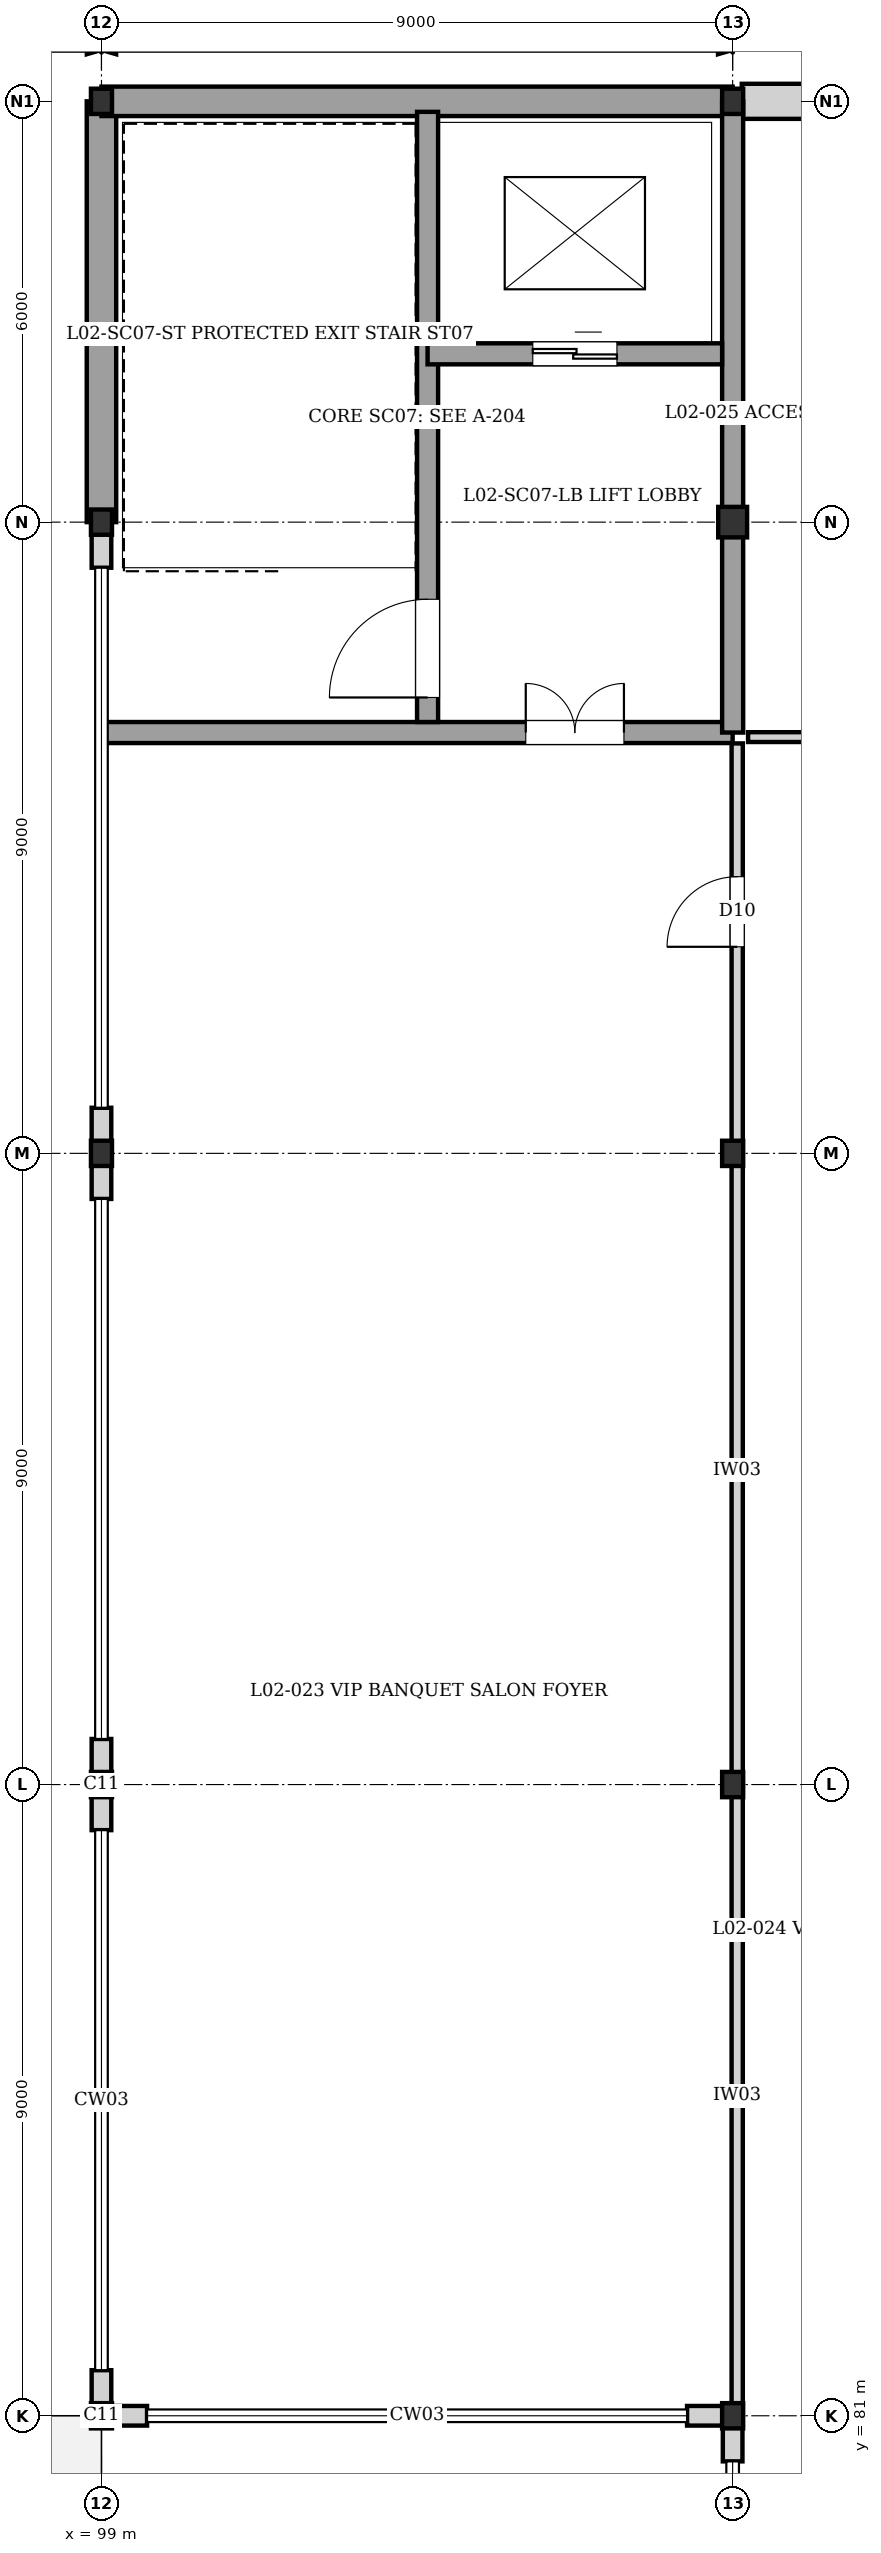
"""IFC4 building model, lengths in metres.
Left out: names, types, materials, properties, quantities, classifications, styles, units other than length and angle.
Written with IfcOpenShell. Run it as: python <this file> out.ifc"""

import sys

from ifc_helpers import new_model, si_unit, direction, frame, frame_2d, origin, origin_2d, place, context, subcontext, project, spatial, rectangle, i_section, extrude, element, fill, save


model = new_model("IFC4")
c1 = context("Model", 3, precision=1e-05, world=origin(), true_north=direction((0.0, 1.0)))
c2 = subcontext(c1, "Body", "Model", "MODEL_VIEW")
j1 = project(units=[si_unit("LENGTHUNIT", "METRE"), si_unit("PLANEANGLEUNIT", "RADIAN")], contexts=[c1])
p1 = place(None, origin())
s1 = spatial("IfcSite", under=j1, at=p1, CompositionType="ELEMENT")
p2 = place(p1, origin())
s2 = spatial("IfcBuilding", under=s1, at=p2, CompositionType="ELEMENT")
p3 = place(p2, frame((0.0, 0.0, 8.16)))
s3 = spatial("IfcBuildingStorey", under=s2, at=p3, CompositionType="ELEMENT", Elevation=8.16)
for number, where, z_axis, x_axis in (
    (1, (99.0, 81.0, 0.0), (0.0, 0.0, 1.0), (1.0, 0.0, 0.0)),
    (2, (99.0, 90.0, 0.0), (0.0, 0.0, 1.0), (1.0, 0.0, 0.0)),
    (3, (99.0, 99.0, 0.0), (0.0, 0.0, 1.0), (1.0, 0.0, 0.0)),
    (4, (99.0, 108.0, 0.0), (0.0, 0.0, 1.0), (1.0, 0.0, 0.0)),
    (5, (99.0, 114.0, 0.0), (0.0, 0.0, 1.0), (1.0, 0.0, 0.0)),
    (6, (108.0, 81.0, 0.0), (0.0, 0.0, 1.0), (1.0, 0.0, 0.0)),
    (7, (108.0, 90.0, 0.0), (0.0, 0.0, 1.0), (1.0, 0.0, 0.0)),
    (8, (108.0, 99.0, 0.0), (0.0, 0.0, 1.0), (1.0, 0.0, 0.0)),
):
    element("IfcColumn", number, at=place(p3, frame(where, z_axis=z_axis, x_axis=x_axis)), inside=s3, PredefinedType="COLUMN", context=c2, shape_type="SweptSolid", body=[
        extrude(i_section(OverallWidth=0.3, OverallDepth=0.36, WebThickness=0.012, FlangeThickness=0.022, at=origin_2d()), origin(), (0.0, 0.0, 1.0), 3.36),
    ])
p4 = place(p3, frame((108.0, 108.0, 0.0), z_axis=(0.0, 0.0, 1.0), x_axis=(1.0, 0.0, 0.0)))
e9 = element("IfcColumn", 9, at=p4, inside=s3, PredefinedType="COLUMN", context=c2, shape_type="SweptSolid", body=[
    extrude(i_section(OverallWidth=0.412, OverallDepth=0.435, WebThickness=0.027, FlangeThickness=0.046, at=origin_2d()), origin(), (0.0, 0.0, 1.0), 3.36),
])
p5 = place(p3, frame((108.0, 114.0, 0.0), z_axis=(0.0, 0.0, 1.0), x_axis=(1.0, 0.0, 0.0)))
e10 = element("IfcColumn", 10, at=p5, inside=s3, PredefinedType="COLUMN", context=c2, shape_type="SweptSolid", body=[
    extrude(i_section(OverallWidth=0.3, OverallDepth=0.36, WebThickness=0.012, FlangeThickness=0.022, at=origin_2d()), origin(), (0.0, 0.0, 1.0), 3.36),
])
p6 = place(p3, frame((108.0, 80.35, 0.0), z_axis=(0.0, 0.0, 1.0), x_axis=(0.0, 1.0, 0.0)))
e11 = element("IfcWall", 11, at=p6, inside=s3, PredefinedType="SOLIDWALL", context=c2, shape_type="SweptSolid", body=[
    extrude(rectangle(XDim=0.495, YDim=0.28, at=frame_2d((0.248, 0.0))), origin(), (0.0, 0.0, 1.0), 3.11),
])
for number, where, z_axis, x_axis in (
    (12, (108.0, 81.0, 0.0), (0.0, 0.0, 1.0), (-1.0, 0.0, 0.0)),
    (13, (99.65, 81.0, 0.0), (0.0, 0.0, 1.0), (-1.0, 0.0, 0.0)),
):
    element("IfcWall", number, at=place(p3, frame(where, z_axis=z_axis, x_axis=x_axis)), inside=s3, PredefinedType="SOLIDWALL", context=c2, shape_type="SweptSolid", body=[
        extrude(rectangle(XDim=0.65, YDim=0.28, at=frame_2d((0.325, 0.0))), origin(), (0.0, 0.0, 1.0), 2.7),
    ])
p7 = place(p3, frame((99.0, 81.155, 0.0), z_axis=(0.0, 0.0, 1.0), x_axis=(0.0, 1.0, 0.0)))
e14 = element("IfcWall", 14, at=p7, inside=s3, PredefinedType="SOLIDWALL", context=c2, shape_type="SweptSolid", body=[
    extrude(rectangle(XDim=0.495, YDim=0.28, at=frame_2d((0.248, 0.0))), origin(), (0.0, 0.0, 1.0), 3.11),
])
p8 = place(p3, frame((99.0, 89.35, 0.0), z_axis=(0.0, 0.0, 1.0), x_axis=(0.0, 1.0, 0.0)))
e15 = element("IfcWall", 15, at=p8, inside=s3, PredefinedType="SOLIDWALL", context=c2, shape_type="SweptSolid", body=[
    extrude(rectangle(XDim=0.65, YDim=0.28, at=frame_2d((0.325, 0.0))), origin(), (0.0, 0.0, 1.0), 2.74),
])
for number, where, z_axis, x_axis in (
    (16, (99.0, 90.0, 0.0), (0.0, 0.0, 1.0), (0.0, 1.0, 0.0)),
    (17, (99.0, 98.35, 0.0), (0.0, 0.0, 1.0), (0.0, 1.0, 0.0)),
):
    element("IfcWall", number, at=place(p3, frame(where, z_axis=z_axis, x_axis=x_axis)), inside=s3, PredefinedType="SOLIDWALL", context=c2, shape_type="SweptSolid", body=[
        extrude(rectangle(XDim=0.65, YDim=0.28, at=frame_2d((0.325, 0.0))), origin(), (0.0, 0.0, 1.0), 2.7),
    ])
for number, where, z_axis, x_axis in (
    (18, (99.0, 99.0, 0.0), (0.0, 0.0, 1.0), (0.0, 1.0, 0.0)),
    (19, (99.0, 107.35, 0.0), (0.0, 0.0, 1.0), (0.0, 1.0, 0.0)),
):
    element("IfcWall", number, at=place(p3, frame(where, z_axis=z_axis, x_axis=x_axis)), inside=s3, PredefinedType="SOLIDWALL", context=c2, shape_type="SweptSolid", body=[
        extrude(rectangle(XDim=0.65, YDim=0.28, at=frame_2d((0.325, 0.0))), origin(), (0.0, 0.0, 1.0), 3.11),
    ])
p9 = place(p3, frame((99.0, 108.0, 0.0), z_axis=(0.0, 0.0, 1.0), x_axis=(0.0, 1.0, 0.0)))
e20 = element("IfcWall", 20, at=p9, inside=s3, PredefinedType="SOLIDWALL", context=c2, shape_type="SweptSolid", body=[
    extrude(rectangle(XDim=6.0, YDim=0.42, at=frame_2d((3.0, 0.0))), origin(), (0.0, 0.0, 1.0), 3.11),
])
p10 = place(p3, frame((99.0, 114.0, 0.0), z_axis=(0.0, 0.0, 1.0), x_axis=(1.0, 0.0, 0.0)))
e21 = element("IfcWall", 21, at=p10, inside=s3, PredefinedType="SOLIDWALL", context=c2, shape_type="SweptSolid", body=[
    extrude(rectangle(XDim=9.0, YDim=0.42, at=frame_2d((4.5, 0.0))), origin(), (0.0, 0.0, 1.0), 3.11),
])
p11 = place(p3, frame((108.13, 114.0, 0.0), z_axis=(0.0, 0.0, 1.0), x_axis=(1.0, 0.0, 0.0)))
e22 = element("IfcWall", 22, at=p11, inside=s3, PredefinedType="SOLIDWALL", context=c2, shape_type="SweptSolid", body=[
    extrude(rectangle(XDim=8.87, YDim=0.5, at=frame_2d((4.435, 0.0))), origin(), (0.0, 0.0, 1.0), 2.87),
])
p12 = place(p3, frame((99.0, 105.0, 0.0), z_axis=(0.0, 0.0, 1.0), x_axis=(1.0, 0.0, 0.0)))
e23 = element("IfcWall", 23, at=p12, inside=s3, PredefinedType="SHEAR", context=c2, shape_type="SweptSolid", body=[
    extrude(rectangle(XDim=9.0, YDim=0.3, at=frame_2d((4.5, 0.0))), origin(), (0.0, 0.0, 1.0), 3.11),
])
p13 = place(p12, frame((6.05, 0.0, 0.0)))
e24 = element("IfcOpeningElement", 24, at=p13, cuts=e23, PredefinedType="OPENING", context=c2, shape_type="SweptSolid", body=[
    extrude(rectangle(XDim=1.4, YDim=2.02, at=frame_2d((0.7, 1.01))), frame((0.0, 0.16, 0.0), z_axis=(0.0, -1.0, 0.0), x_axis=(1.0, 0.0, 0.0)), (0.0, 0.0, 1.0), 0.32),
])
p14 = place(p3, frame((108.0, 105.0, 0.0), z_axis=(0.0, 0.0, 1.0), x_axis=(0.0, 1.0, 0.0)))
e25 = element("IfcWall", 25, at=p14, inside=s3, PredefinedType="SHEAR", context=c2, shape_type="SweptSolid", body=[
    extrude(rectangle(XDim=9.0, YDim=0.3, at=frame_2d((4.5, 0.0))), origin(), (0.0, 0.0, 1.0), 3.11),
])
p15 = place(p3, frame((103.65, 105.15, 0.0), z_axis=(0.0, 0.0, 1.0), x_axis=(0.0, 1.0, 0.0)))
e26 = element("IfcWall", 26, at=p15, inside=s3, PredefinedType="SHEAR", context=c2, shape_type="SweptSolid", body=[
    extrude(rectangle(XDim=8.7, YDim=0.3, at=frame_2d((4.35, 0.0))), origin(), (0.0, 0.0, 1.0), 3.11),
])
p16 = place(p15, frame((0.35, 0.0, 0.0)))
e27 = element("IfcOpeningElement", 27, at=p16, cuts=e26, PredefinedType="OPENING", context=c2, shape_type="SweptSolid", body=[
    extrude(rectangle(XDim=1.4, YDim=2.02, at=frame_2d((0.7, 1.01))), frame((0.0, 0.16, 0.0), z_axis=(0.0, -1.0, 0.0), x_axis=(1.0, 0.0, 0.0)), (0.0, 0.0, 1.0), 0.32),
])
p17 = place(p3, frame((103.65, 110.4, 0.0), z_axis=(0.0, 0.0, 1.0), x_axis=(1.0, 0.0, 0.0)))
e28 = element("IfcWall", 28, at=p17, inside=s3, PredefinedType="SHEAR", context=c2, shape_type="SweptSolid", body=[
    extrude(rectangle(XDim=4.2, YDim=0.3, at=frame_2d((2.1, 0.0))), origin(), (0.0, 0.0, 1.0), 3.11),
])
p18 = place(p17, frame((1.5, 0.0, 0.0)))
e29 = element("IfcOpeningElement", 29, at=p18, cuts=e28, PredefinedType="OPENING", context=c2, shape_type="SweptSolid", body=[
    extrude(rectangle(XDim=1.2, YDim=2.2, at=frame_2d((0.6, 1.1))), frame((0.0, 0.16, 0.0), z_axis=(0.0, -1.0, 0.0), x_axis=(1.0, 0.0, 0.0)), (0.0, 0.0, 1.0), 0.32),
])
p19 = place(p3, frame((108.065, 81.145, 0.0), z_axis=(0.0, 0.0, 1.0), x_axis=(0.0, 1.0, 0.0)))
e30 = element("IfcWall", 30, at=p19, inside=s3, PredefinedType="PARTITIONING", context=c2, shape_type="SweptSolid", body=[
    extrude(rectangle(XDim=8.835, YDim=0.16, at=frame_2d((4.417, 0.0))), origin(), (0.0, 0.0, 1.0), 2.74),
])
p20 = place(p3, frame((108.22, 104.935, 0.0), z_axis=(0.0, 0.0, 1.0), x_axis=(1.0, 0.0, 0.0)))
e31 = element("IfcWall", 31, at=p20, inside=s3, PredefinedType="PLUMBINGWALL", context=c2, shape_type="SweptSolid", body=[
    extrude(rectangle(XDim=17.685, YDim=0.14, at=frame_2d((8.843, 0.0))), origin(), (0.0, 0.0, 1.0), 3.11),
])
p21 = place(p20, frame((1.95, 0.0, 0.0)))
e32 = element("IfcOpeningElement", 32, at=p21, cuts=e31, PredefinedType="OPENING", context=c2, shape_type="SweptSolid", body=[
    extrude(rectangle(XDim=0.9, YDim=2.1, at=frame_2d((0.45, 1.05))), frame((0.0, 0.08, 0.0), z_axis=(0.0, -1.0, 0.0), x_axis=(1.0, 0.0, 0.0)), (0.0, 0.0, 1.0), 0.16),
])
p22 = place(p3, frame((108.065, 89.98, 0.0), z_axis=(0.0, 0.0, 1.0), x_axis=(0.0, 1.0, 0.0)))
e33 = element("IfcWall", 33, at=p22, inside=s3, PredefinedType="PARTITIONING", context=c2, shape_type="SweptSolid", body=[
    extrude(rectangle(XDim=9.0, YDim=0.16, at=frame_2d((4.5, 0.0))), origin(), (0.0, 0.0, 1.0), 2.7),
])
p23 = place(p3, frame((108.065, 98.98, 0.0), z_axis=(0.0, 0.0, 1.0), x_axis=(0.0, 1.0, 0.0)))
e34 = element("IfcWall", 34, at=p23, inside=s3, PredefinedType="PARTITIONING", context=c2, shape_type="SweptSolid", body=[
    extrude(rectangle(XDim=5.865, YDim=0.16, at=frame_2d((2.933, 0.0))), origin(), (0.0, 0.0, 1.0), 3.11),
])
p24 = place(p23, frame((2.965, 0.0, 0.0)))
e35 = element("IfcOpeningElement", 35, at=p24, cuts=e34, PredefinedType="OPENING", context=c2, shape_type="SweptSolid", body=[
    extrude(rectangle(XDim=1.0, YDim=2.1, at=frame_2d((0.5, 1.05))), frame((0.0, 0.09, 0.0), z_axis=(0.0, -1.0, 0.0), x_axis=(1.0, 0.0, 0.0)), (0.0, 0.0, 1.0), 0.18),
])
p25 = place(p13, origin())
e36 = element("IfcDoor", 36, at=p25, inside=s3, OperationType="DOUBLE_DOOR_SINGLE_SWING", PredefinedType="DOOR", context=c2, shape_type="SweptSolid", body=[
    extrude(rectangle(XDim=1.4, YDim=2.02, at=frame_2d((0.7, 1.01))), frame((0.0, 0.025, 0.0), z_axis=(0.0, -1.0, 0.0), x_axis=(1.0, 0.0, 0.0)), (0.0, 0.0, 1.0), 0.05),
])
fill(e24, e36)
p26 = place(p16, origin())
e37 = element("IfcDoor", 37, at=p26, inside=s3, OperationType="SINGLE_SWING_LEFT", PredefinedType="DOOR", context=c2, shape_type="SweptSolid", body=[
    extrude(rectangle(XDim=1.4, YDim=2.02, at=frame_2d((0.7, 1.01))), frame((0.0, 0.025, 0.0), z_axis=(0.0, -1.0, 0.0), x_axis=(1.0, 0.0, 0.0)), (0.0, 0.0, 1.0), 0.05),
])
fill(e27, e37)
p27 = place(p18, origin())
e38 = element("IfcDoor", 38, at=p27, inside=s3, OperationType="DOUBLE_DOOR_SLIDING", PredefinedType="DOOR", context=c2, shape_type="SweptSolid", body=[
    extrude(rectangle(XDim=1.2, YDim=2.2, at=frame_2d((0.6, 1.1))), frame((0.0, 0.025, 0.0), z_axis=(0.0, -1.0, 0.0), x_axis=(1.0, 0.0, 0.0)), (0.0, 0.0, 1.0), 0.05),
])
fill(e29, e38)
p28 = place(p24, origin())
e39 = element("IfcDoor", 39, at=p28, inside=s3, OperationType="SINGLE_SWING_LEFT", PredefinedType="DOOR", context=c2, shape_type="SweptSolid", body=[
    extrude(rectangle(XDim=1.0, YDim=2.1, at=frame_2d((0.5, 1.05))), frame((0.0, 0.025, 0.0), z_axis=(0.0, -1.0, 0.0), x_axis=(1.0, 0.0, 0.0)), (0.0, 0.0, 1.0), 0.05),
])
fill(e35, e39)
save(model, sys.argv[1])
